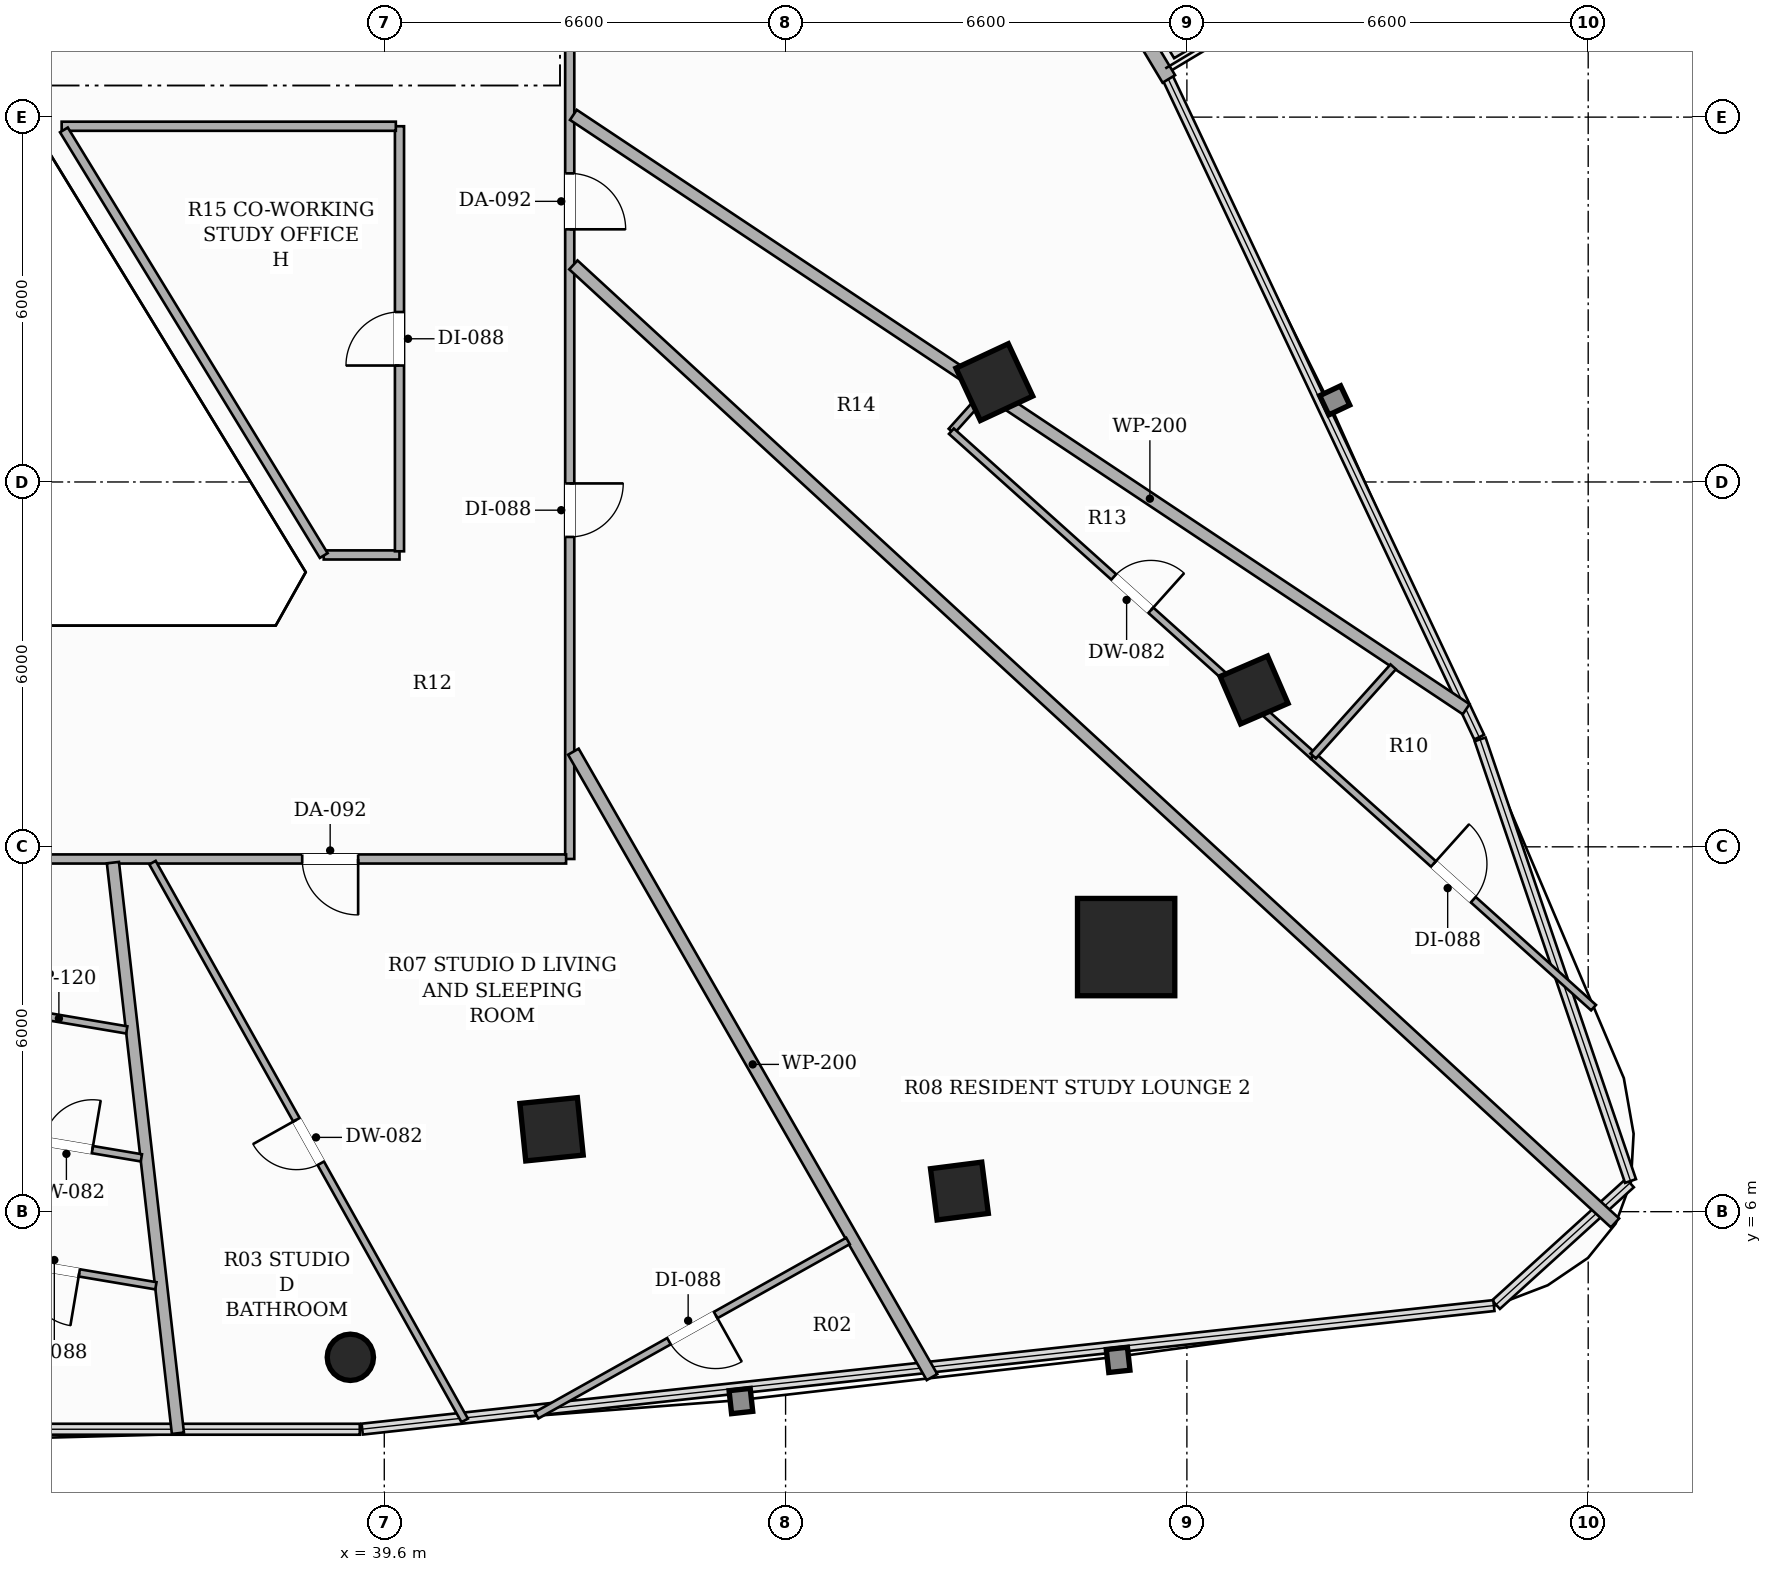
"""IFC4 building model, lengths in metres.
Left out: names, types, materials, properties, quantities, classifications, styles, units other than length and angle.
Written with IfcOpenShell. Run it as: python <this file> out.ifc"""

import sys

from ifc_helpers import new_model, si_unit, direction, frame, frame_2d, origin, origin_2d, place, context, subcontext, project, spatial, rectangle, hollow_rectangle, hollow_circle, extrude, element, fill, save


model = new_model("IFC4")
c1 = context("Model", 3, precision=1e-05, world=origin(), true_north=direction((0.0, 1.0)))
c2 = subcontext(c1, "Body", "Model", "MODEL_VIEW")
j1 = project(units=[si_unit("LENGTHUNIT", "METRE"), si_unit("PLANEANGLEUNIT", "RADIAN")], contexts=[c1])
p1 = place(None, origin())
s1 = spatial("IfcSite", under=j1, at=p1, CompositionType="ELEMENT")
p2 = place(p1, origin())
s2 = spatial("IfcBuilding", under=s1, at=p2, CompositionType="ELEMENT")
p3 = place(p2, frame((0.0, 0.0, 90.65)))
s3 = spatial("IfcBuildingStorey", under=s2, at=p3, CompositionType="ELEMENT", Elevation=90.65)
p4 = place(p3, frame((51.801, 10.351, 0.0), z_axis=(0.0, 0.0, 1.0), x_axis=(1.0, 0.0, 0.0)))
e1 = element("IfcColumn", 1, at=p4, inside=s3, PredefinedType="COLUMN", context=c2, shape_type="SweptSolid", body=[
    extrude(hollow_rectangle(XDim=1.6, YDim=1.6, WallThickness=0.05, at=origin_2d()), origin(), (0.0, 0.0, 1.0), 3.3),
])
for number, where, z_axis, x_axis in (
    (2, (42.351, 7.355, 0.0), (0.0, 0.0, 1.0), (0.995, 0.101, 0.0)),
    (3, (49.633, 19.642, 0.0), (0.0, 0.0, 1.0), (-0.423, 0.906, 0.0)),
):
    element("IfcColumn", number, at=place(p3, frame(where, z_axis=z_axis, x_axis=x_axis)), inside=s3, PredefinedType="COLUMN", context=c2, shape_type="SweptSolid", body=[
        extrude(hollow_rectangle(XDim=0.95, YDim=0.95, WallThickness=0.032, at=origin_2d()), origin(), (0.0, 0.0, 1.0), 3.3),
    ])
for number, where, z_axis, x_axis in (
    (4, (49.059, 6.339, 0.0), (0.0, 0.0, 1.0), (0.992, 0.127, 0.0)),
    (5, (53.905, 14.58, 0.0), (0.0, 0.0, 1.0), (-0.397, 0.918, 0.0)),
):
    element("IfcColumn", number, at=place(p3, frame(where, z_axis=z_axis, x_axis=x_axis)), inside=s3, PredefinedType="COLUMN", context=c2, shape_type="SweptSolid", body=[
        extrude(hollow_rectangle(XDim=0.85, YDim=0.85, WallThickness=0.028, at=origin_2d()), origin(), (0.0, 0.0, 1.0), 3.3),
    ])
p5 = place(p3, frame((39.042, 3.605, 0.0), z_axis=(0.0, 0.0, 1.0), x_axis=(1.0, 0.0, 0.0)))
e6 = element("IfcColumn", 6, at=p5, inside=s3, PredefinedType="COLUMN", context=c2, shape_type="SweptSolid", body=[
    extrude(hollow_circle(Radius=0.381, WallThickness=0.022, at=origin_2d()), origin(), (0.0, 0.0, 1.0), 3.3),
])
p6 = place(p3, frame((52.503, 24.628, 0.0), z_axis=(0.0, 0.0, 1.0), x_axis=(-0.514369419392, 0.857568714678, 0.0)))
e7 = element("IfcWall", 7, at=p6, inside=s3, PredefinedType="SOLIDWALL", context=c2, shape_type="SweptSolid", body=[
    extrude(rectangle(XDim=12.22, YDim=0.24, at=frame_2d((6.11, 0.0))), origin(), (0.0, 0.0, 1.0), 2.624),
])
p7 = place(p6, frame((9.723, 0.0, 0.0)))
e8 = element("IfcOpeningElement", 8, at=p7, cuts=e7, PredefinedType="OPENING", context=c2, shape_type="SweptSolid", body=[
    extrude(rectangle(XDim=1.8, YDim=2.2, at=frame_2d((0.9, 1.1))), frame((0.0, 0.13, 0.0), z_axis=(0.0, -1.0, 0.0), x_axis=(1.0, 0.0, 0.0)), (0.0, 0.0, 1.0), 0.26),
])
p8 = place(p3, frame((42.65, 36.84, 0.0), z_axis=(0.0, 0.0, 1.0), x_axis=(0.0, -1.0, 0.0)))
e9 = element("IfcWall", 9, at=p8, inside=s3, PredefinedType="PARTITIONING", context=c2, shape_type="SweptSolid", body=[
    extrude(rectangle(XDim=25.04, YDim=0.15, at=frame_2d((12.52, 0.0))), origin(), (0.0, 0.0, 1.0), 2.413),
])
p9 = place(p8, frame((6.114, 0.0, 0.0)))
e10 = element("IfcOpeningElement", 10, at=p9, cuts=e9, PredefinedType="OPENING", context=c2, shape_type="SweptSolid", body=[
    extrude(rectangle(XDim=0.88, YDim=2.1, at=frame_2d((0.44, 1.05))), frame((0.0, 0.085, 0.0), z_axis=(0.0, -1.0, 0.0), x_axis=(1.0, 0.0, 0.0)), (0.0, 0.0, 1.0), 0.17),
])
p10 = place(p8, frame((18.864, 0.0, 0.0)))
e11 = element("IfcOpeningElement", 11, at=p10, cuts=e9, PredefinedType="OPENING", context=c2, shape_type="SweptSolid", body=[
    extrude(rectangle(XDim=0.88, YDim=2.1, at=frame_2d((0.44, 1.05))), frame((0.0, 0.085, 0.0), z_axis=(0.0, -1.0, 0.0), x_axis=(1.0, 0.0, 0.0)), (0.0, 0.0, 1.0), 0.17),
])
p11 = place(p8, frame((13.765, 0.0, 0.0)))
e12 = element("IfcOpeningElement", 12, at=p11, cuts=e9, PredefinedType="OPENING", context=c2, shape_type="SweptSolid", body=[
    extrude(rectangle(XDim=0.92, YDim=2.15, at=frame_2d((0.46, 1.075))), frame((0.0, 0.085, 0.0), z_axis=(0.0, -1.0, 0.0), x_axis=(1.0, 0.0, 0.0)), (0.0, 0.0, 1.0), 0.17),
])
p12 = place(p3, frame((42.59, 11.8, 0.0), z_axis=(0.0, 0.0, 1.0), x_axis=(-1.0, 0.0, 0.0)))
e13 = element("IfcWall", 13, at=p12, inside=s3, PredefinedType="PARTITIONING", context=c2, shape_type="SweptSolid", body=[
    extrude(rectangle(XDim=19.24, YDim=0.15, at=frame_2d((9.62, 0.0))), origin(), (0.0, 0.0, 1.0), 2.669),
])
p13 = place(p12, frame((11.192, 0.0, 0.0)))
e14 = element("IfcOpeningElement", 14, at=p13, cuts=e13, PredefinedType="OPENING", context=c2, shape_type="SweptSolid", body=[
    extrude(rectangle(XDim=0.92, YDim=2.15, at=frame_2d((0.46, 1.075))), frame((0.0, 0.085, 0.0), z_axis=(0.0, -1.0, 0.0), x_axis=(1.0, 0.0, 0.0)), (0.0, 0.0, 1.0), 0.17),
])
p14 = place(p12, frame((3.42, 0.0, 0.0)))
e15 = element("IfcOpeningElement", 15, at=p14, cuts=e13, PredefinedType="OPENING", context=c2, shape_type="SweptSolid", body=[
    extrude(rectangle(XDim=0.92, YDim=2.15, at=frame_2d((0.46, 1.075))), frame((0.0, 0.085, 0.0), z_axis=(0.0, -1.0, 0.0), x_axis=(1.0, 0.0, 0.0)), (0.0, 0.0, 1.0), 0.17),
])
p15 = place(p3, frame((38.604, 16.8, 0.0), z_axis=(0.0, 0.0, 1.0), x_axis=(1.0, 0.0, 0.0)))
e16 = element("IfcWall", 16, at=p15, inside=s3, PredefinedType="PARTITIONING", context=c2, shape_type="SweptSolid", body=[
    extrude(rectangle(XDim=1.246, YDim=0.15, at=frame_2d((0.623, 0.0))), origin(), (0.0, 0.0, 1.0), 3.06),
])
p16 = place(p3, frame((39.85, 16.86, 0.0), z_axis=(0.0, 0.0, 1.0), x_axis=(0.0, 1.0, 0.0)))
e17 = element("IfcWall", 17, at=p16, inside=s3, PredefinedType="PARTITIONING", context=c2, shape_type="SweptSolid", body=[
    extrude(rectangle(XDim=6.99, YDim=0.15, at=frame_2d((3.495, 0.0))), origin(), (0.0, 0.0, 1.0), 2.669),
])
p17 = place(p16, frame((3.055, 0.0, 0.0)))
e18 = element("IfcOpeningElement", 18, at=p17, cuts=e17, PredefinedType="OPENING", context=c2, shape_type="SweptSolid", body=[
    extrude(rectangle(XDim=0.88, YDim=2.1, at=frame_2d((0.44, 1.05))), frame((0.0, 0.085, 0.0), z_axis=(0.0, -1.0, 0.0), x_axis=(1.0, 0.0, 0.0)), (0.0, 0.0, 1.0), 0.17),
])
p18 = place(p3, frame((39.79, 23.85, 0.0), z_axis=(0.0, 0.0, 1.0), x_axis=(-1.0, 0.0, 0.0)))
e19 = element("IfcWall", 19, at=p18, inside=s3, PredefinedType="PARTITIONING", context=c2, shape_type="SweptSolid", body=[
    extrude(rectangle(XDim=5.496, YDim=0.15, at=frame_2d((2.748, 0.0))), origin(), (0.0, 0.0, 1.0), 2.669),
])
p19 = place(p3, frame((34.331, 23.79, 0.0), z_axis=(0.0, 0.0, 1.0), x_axis=(0.52102126657, -0.853543695297, 0.0)))
e20 = element("IfcWall", 20, at=p19, inside=s3, PredefinedType="PARTITIONING", context=c2, shape_type="SweptSolid", body=[
    extrude(rectangle(XDim=8.201, YDim=0.15, at=frame_2d((4.101, 0.0))), origin(), (0.0, 0.0, 1.0), 2.669),
])
p20 = place(p3, frame((57.393, 14.263, 0.0), z_axis=(0.0, 0.0, 1.0), x_axis=(-0.83243126042, 0.554128321488, 0.0)))
e21 = element("IfcWall", 21, at=p20, inside=s3, PredefinedType="PARTITIONING", context=c2, shape_type="SweptSolid", body=[
    extrude(rectangle(XDim=17.639, YDim=0.2, at=frame_2d((8.819, 0.0))), origin(), (0.0, 0.0, 1.0), 2.413),
])
p21 = place(p3, frame((48.608, 3.279, 0.0), z_axis=(0.0, 0.0, 1.0), x_axis=(-0.497428948928, 0.867504720891, 0.0)))
e22 = element("IfcWall", 22, at=p21, inside=s3, PredefinedType="PARTITIONING", context=c2, shape_type="SweptSolid", body=[
    extrude(rectangle(XDim=11.857, YDim=0.2, at=frame_2d((5.928, 0.0))), origin(), (0.0, 0.0, 1.0), 2.413),
])
p22 = place(p3, frame((42.71, 21.57, 0.0), z_axis=(0.0, 0.0, 1.0), x_axis=(0.736048495707, -0.67692880864, 0.0)))
e23 = element("IfcWall", 23, at=p22, inside=s3, PredefinedType="PARTITIONING", context=c2, shape_type="SweptSolid", body=[
    extrude(rectangle(XDim=23.274, YDim=0.2, at=frame_2d((11.637, 0.0))), origin(), (0.0, 0.0, 1.0), 2.413),
])
p23 = place(p3, frame((35.137, 11.74, 0.0), z_axis=(0.0, 0.0, 1.0), x_axis=(0.113194461651, -0.993572852815, 0.0)))
e24 = element("IfcWall", 24, at=p23, inside=s3, PredefinedType="PARTITIONING", context=c2, shape_type="SweptSolid", body=[
    extrude(rectangle(XDim=9.445, YDim=0.2, at=frame_2d((4.722, 0.0))), origin(), (0.0, 0.0, 1.0), 2.413),
])
p24 = place(p3, frame((35.365, 8.989, 0.0), z_axis=(0.0, 0.0, 1.0), x_axis=(-0.986047933852, 0.166461623646, 0.0)))
e25 = element("IfcWall", 25, at=p24, inside=s3, PredefinedType="PARTITIONING", context=c2, shape_type="SweptSolid", body=[
    extrude(rectangle(XDim=2.264, YDim=0.12, at=frame_2d((1.132, 0.0))), origin(), (0.0, 0.0, 1.0), 2.669),
])
p25 = place(p3, frame((32.794, 7.359, 0.0), z_axis=(0.0, 0.0, 1.0), x_axis=(0.986086685245, -0.166231913849, 0.0)))
e26 = element("IfcWall", 26, at=p25, inside=s3, PredefinedType="PARTITIONING", context=c2, shape_type="SweptSolid", body=[
    extrude(rectangle(XDim=2.851, YDim=0.12, at=frame_2d((1.425, 0.0))), origin(), (0.0, 0.0, 1.0), 2.669),
])
p26 = place(p25, frame((1.214, 0.0, 0.0)))
e27 = element("IfcOpeningElement", 27, at=p26, cuts=e26, PredefinedType="OPENING", context=c2, shape_type="SweptSolid", body=[
    extrude(rectangle(XDim=0.82, YDim=2.1, at=frame_2d((0.41, 1.05))), frame((0.0, 0.07, 0.0), z_axis=(0.0, -1.0, 0.0), x_axis=(1.0, 0.0, 0.0)), (0.0, 0.0, 1.0), 0.14),
])
p27 = place(p3, frame((35.844, 4.781, 0.0), z_axis=(0.0, 0.0, 1.0), x_axis=(-0.986098591399, 0.166161271182, 0.0)))
e28 = element("IfcWall", 28, at=p27, inside=s3, PredefinedType="PARTITIONING", context=c2, shape_type="SweptSolid", body=[
    extrude(rectangle(XDim=3.437, YDim=0.12, at=frame_2d((1.718, 0.0))), origin(), (0.0, 0.0, 1.0), 3.06),
])
p28 = place(p27, frame((1.278, 0.0, 0.0)))
e29 = element("IfcOpeningElement", 29, at=p28, cuts=e28, PredefinedType="OPENING", context=c2, shape_type="SweptSolid", body=[
    extrude(rectangle(XDim=0.88, YDim=2.1, at=frame_2d((0.44, 1.05))), frame((0.0, 0.07, 0.0), z_axis=(0.0, -1.0, 0.0), x_axis=(1.0, 0.0, 0.0)), (0.0, 0.0, 1.0), 0.14),
])
p29 = place(p3, frame((40.923, 2.567, 0.0), z_axis=(0.0, 0.0, 1.0), x_axis=(-0.4884640488, 0.872584020613, 0.0)))
e30 = element("IfcWall", 30, at=p29, inside=s3, PredefinedType="PARTITIONING", context=c2, shape_type="SweptSolid", body=[
    extrude(rectangle(XDim=10.512, YDim=0.12, at=frame_2d((5.256, 0.0))), origin(), (0.0, 0.0, 1.0), 2.413),
])
p30 = place(p29, frame((4.846, 0.0, 0.0)))
e31 = element("IfcOpeningElement", 31, at=p30, cuts=e30, PredefinedType="OPENING", context=c2, shape_type="SweptSolid", body=[
    extrude(rectangle(XDim=0.82, YDim=2.1, at=frame_2d((0.41, 1.05))), frame((0.0, 0.07, 0.0), z_axis=(0.0, -1.0, 0.0), x_axis=(1.0, 0.0, 0.0)), (0.0, 0.0, 1.0), 0.14),
])
p31 = place(p3, frame((47.226, 5.518, 0.0), z_axis=(0.0, 0.0, 1.0), x_axis=(-0.872551409816, -0.488522299622, 0.0)))
e32 = element("IfcWall", 32, at=p31, inside=s3, PredefinedType="PARTITIONING", context=c2, shape_type="SweptSolid", body=[
    extrude(rectangle(XDim=5.869, YDim=0.12, at=frame_2d((2.935, 0.0))), origin(), (0.0, 0.0, 1.0), 3.06),
])
p32 = place(p31, frame((2.494, 0.0, 0.0)))
e33 = element("IfcOpeningElement", 33, at=p32, cuts=e32, PredefinedType="OPENING", context=c2, shape_type="SweptSolid", body=[
    extrude(rectangle(XDim=0.88, YDim=2.1, at=frame_2d((0.44, 1.05))), frame((0.0, 0.07, 0.0), z_axis=(0.0, -1.0, 0.0), x_axis=(1.0, 0.0, 0.0)), (0.0, 0.0, 1.0), 0.14),
])
p33 = place(p3, frame((49.467, 19.437, 0.0), z_axis=(0.0, 0.0, 1.0), x_axis=(-0.667729657393, -0.744403858559, 0.0)))
e34 = element("IfcWall", 34, at=p33, inside=s3, PredefinedType="PARTITIONING", context=c2, shape_type="SweptSolid", body=[
    extrude(rectangle(XDim=0.809, YDim=0.12, at=frame_2d((0.404, 0.0))), origin(), (0.0, 0.0, 1.0), 2.413),
])
p34 = place(p3, frame((48.927, 18.835, 0.0), z_axis=(0.0, 0.0, 1.0), x_axis=(0.744157434795, -0.668004275615, 0.0)))
e35 = element("IfcWall", 35, at=p34, inside=s3, PredefinedType="PARTITIONING", context=c2, shape_type="SweptSolid", body=[
    extrude(rectangle(XDim=7.996, YDim=0.12, at=frame_2d((3.998, 0.0))), origin(), (0.0, 0.0, 1.0), 2.413),
])
p35 = place(p34, frame((3.588, 0.0, 0.0)))
e36 = element("IfcOpeningElement", 36, at=p35, cuts=e35, PredefinedType="OPENING", context=c2, shape_type="SweptSolid", body=[
    extrude(rectangle(XDim=0.82, YDim=2.1, at=frame_2d((0.41, 1.05))), frame((0.0, 0.07, 0.0), z_axis=(0.0, -1.0, 0.0), x_axis=(1.0, 0.0, 0.0)), (0.0, 0.0, 1.0), 0.14),
])
p36 = place(p3, frame((54.877, 13.494, 0.0), z_axis=(0.0, 0.0, 1.0), x_axis=(0.744181011259, -0.667978010477, 0.0)))
e37 = element("IfcWall", 37, at=p36, inside=s3, PredefinedType="PARTITIONING", context=c2, shape_type="SweptSolid", body=[
    extrude(rectangle(XDim=6.196, YDim=0.12, at=frame_2d((3.098, 0.0))), origin(), (0.0, 0.0, 1.0), 2.619),
])
p37 = place(p36, frame((2.658, 0.0, 0.0)))
e38 = element("IfcOpeningElement", 38, at=p37, cuts=e37, PredefinedType="OPENING", context=c2, shape_type="SweptSolid", body=[
    extrude(rectangle(XDim=0.88, YDim=2.1, at=frame_2d((0.44, 1.05))), frame((0.0, 0.07, 0.0), z_axis=(0.0, -1.0, 0.0), x_axis=(1.0, 0.0, 0.0)), (0.0, 0.0, 1.0), 0.14),
])
p38 = place(p3, frame((56.193, 14.96, 0.0), z_axis=(0.0, 0.0, 1.0), x_axis=(-0.668039966909, -0.744125394414, 0.0)))
e39 = element("IfcWall", 39, at=p38, inside=s3, PredefinedType="PARTITIONING", context=c2, shape_type="SweptSolid", body=[
    extrude(rectangle(XDim=1.97, YDim=0.12, at=frame_2d((0.985, 0.0))), origin(), (0.0, 0.0, 1.0), 2.619),
])
p39 = place(p10, origin())
e40 = element("IfcDoor", 40, at=p39, inside=s3, OperationType="SINGLE_SWING_LEFT", PredefinedType="DOOR", context=c2, shape_type="SweptSolid", body=[
    extrude(rectangle(XDim=0.88, YDim=2.1, at=frame_2d((0.44, 1.05))), frame((0.0, 0.025, 0.0), z_axis=(0.0, -1.0, 0.0), x_axis=(1.0, 0.0, 0.0)), (0.0, 0.0, 1.0), 0.05),
])
fill(e11, e40)
p40 = place(p26, origin())
e41 = element("IfcDoor", 41, at=p40, inside=s3, OperationType="SINGLE_SWING_RIGHT", PredefinedType="DOOR", context=c2, shape_type="SweptSolid", body=[
    extrude(rectangle(XDim=0.82, YDim=2.1, at=frame_2d((0.41, 1.05))), frame((0.0, 0.025, 0.0), z_axis=(0.0, -1.0, 0.0), x_axis=(1.0, 0.0, 0.0)), (0.0, 0.0, 1.0), 0.05),
])
fill(e27, e41)
p41 = place(p28, origin())
e42 = element("IfcDoor", 42, at=p41, inside=s3, OperationType="SINGLE_SWING_LEFT", PredefinedType="DOOR", context=c2, shape_type="SweptSolid", body=[
    extrude(rectangle(XDim=0.88, YDim=2.1, at=frame_2d((0.44, 1.05))), frame((0.0, 0.025, 0.0), z_axis=(0.0, -1.0, 0.0), x_axis=(1.0, 0.0, 0.0)), (0.0, 0.0, 1.0), 0.05),
])
fill(e29, e42)
p42 = place(p14, origin())
e43 = element("IfcDoor", 43, at=p42, inside=s3, OperationType="SINGLE_SWING_LEFT", PredefinedType="DOOR", context=c2, shape_type="SweptSolid", body=[
    extrude(rectangle(XDim=0.92, YDim=2.15, at=frame_2d((0.46, 1.075))), frame((0.0, 0.025, 0.0), z_axis=(0.0, -1.0, 0.0), x_axis=(1.0, 0.0, 0.0)), (0.0, 0.0, 1.0), 0.05),
])
fill(e15, e43)
p43 = place(p30, origin())
e44 = element("IfcDoor", 44, at=p43, inside=s3, OperationType="SINGLE_SWING_RIGHT", PredefinedType="DOOR", context=c2, shape_type="SweptSolid", body=[
    extrude(rectangle(XDim=0.82, YDim=2.1, at=frame_2d((0.41, 1.05))), frame((0.0, 0.025, 0.0), z_axis=(0.0, -1.0, 0.0), x_axis=(1.0, 0.0, 0.0)), (0.0, 0.0, 1.0), 0.05),
])
fill(e31, e44)
p44 = place(p32, origin())
e45 = element("IfcDoor", 45, at=p44, inside=s3, OperationType="SINGLE_SWING_LEFT", PredefinedType="DOOR", context=c2, shape_type="SweptSolid", body=[
    extrude(rectangle(XDim=0.88, YDim=2.1, at=frame_2d((0.44, 1.05))), frame((0.0, 0.025, 0.0), z_axis=(0.0, -1.0, 0.0), x_axis=(1.0, 0.0, 0.0)), (0.0, 0.0, 1.0), 0.05),
])
fill(e33, e45)
p45 = place(p11, origin())
e46 = element("IfcDoor", 46, at=p45, inside=s3, OperationType="SINGLE_SWING_RIGHT", PredefinedType="DOOR", context=c2, shape_type="SweptSolid", body=[
    extrude(rectangle(XDim=0.92, YDim=2.15, at=frame_2d((0.46, 1.075))), frame((0.0, 0.025, 0.0), z_axis=(0.0, -1.0, 0.0), x_axis=(1.0, 0.0, 0.0)), (0.0, 0.0, 1.0), 0.05),
])
fill(e12, e46)
p46 = place(p35, origin())
e47 = element("IfcDoor", 47, at=p46, inside=s3, OperationType="SINGLE_SWING_RIGHT", PredefinedType="DOOR", context=c2, shape_type="SweptSolid", body=[
    extrude(rectangle(XDim=0.82, YDim=2.1, at=frame_2d((0.41, 1.05))), frame((0.0, 0.025, 0.0), z_axis=(0.0, -1.0, 0.0), x_axis=(1.0, 0.0, 0.0)), (0.0, 0.0, 1.0), 0.05),
])
fill(e36, e47)
p47 = place(p37, origin())
e48 = element("IfcDoor", 48, at=p47, inside=s3, OperationType="SINGLE_SWING_LEFT", PredefinedType="DOOR", context=c2, shape_type="SweptSolid", body=[
    extrude(rectangle(XDim=0.88, YDim=2.1, at=frame_2d((0.44, 1.05))), frame((0.0, 0.025, 0.0), z_axis=(0.0, -1.0, 0.0), x_axis=(1.0, 0.0, 0.0)), (0.0, 0.0, 1.0), 0.05),
])
fill(e38, e48)
p48 = place(p17, origin())
e49 = element("IfcDoor", 49, at=p48, inside=s3, OperationType="SINGLE_SWING_LEFT", PredefinedType="DOOR", context=c2, shape_type="SweptSolid", body=[
    extrude(rectangle(XDim=0.88, YDim=2.1, at=frame_2d((0.44, 1.05))), frame((0.0, 0.025, 0.0), z_axis=(0.0, -1.0, 0.0), x_axis=(1.0, 0.0, 0.0)), (0.0, 0.0, 1.0), 0.05),
])
fill(e18, e49)
save(model, sys.argv[1])
